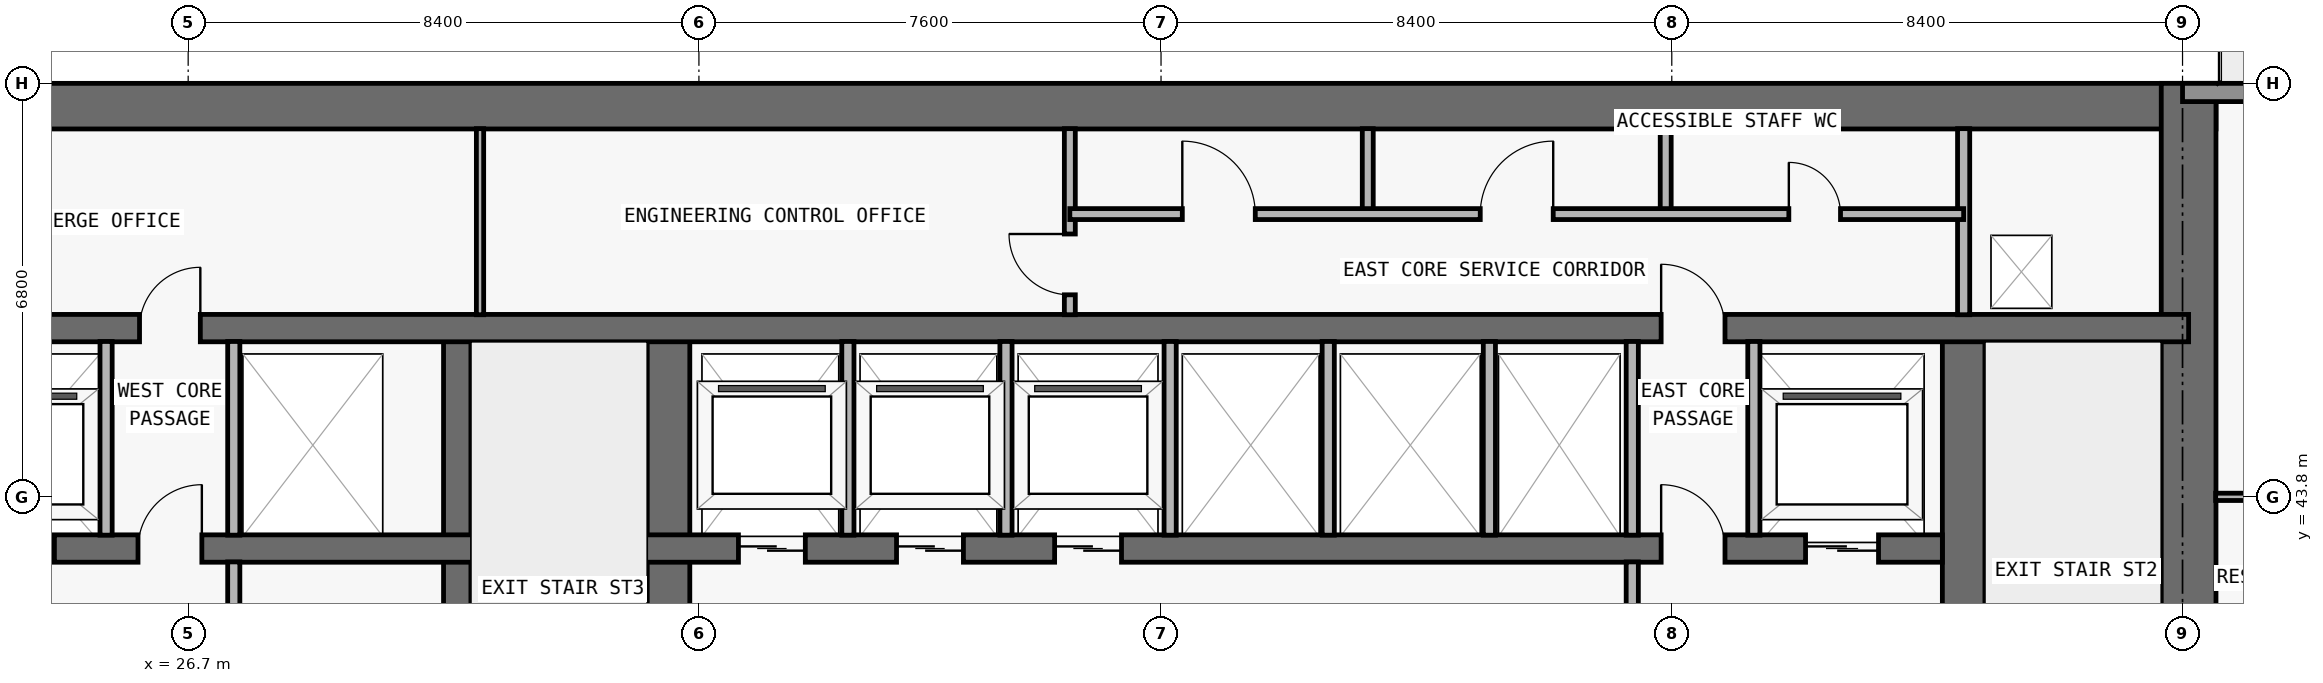
"""IFC4 building model, lengths in metres.
Left out: names, types, materials, properties, quantities, classifications, styles, units other than length and angle.
Written with IfcOpenShell. Run it as: python <this file> out.ifc"""

import sys

from ifc_helpers import new_model, si_unit, direction, frame, frame_2d, origin, place, context, subcontext, project, spatial, rectangle, extrude, element, fill, save


model = new_model("IFC4")
c1 = context("Model", 3, precision=1e-05, world=origin(), true_north=direction((0.0, 1.0)))
c2 = subcontext(c1, "Body", "Model", "MODEL_VIEW")
j1 = project(units=[si_unit("LENGTHUNIT", "METRE"), si_unit("PLANEANGLEUNIT", "RADIAN")], contexts=[c1])
p1 = place(None, origin())
s1 = spatial("IfcSite", under=j1, at=p1, CompositionType="ELEMENT")
p2 = place(p1, origin())
s2 = spatial("IfcBuilding", under=s1, at=p2, CompositionType="ELEMENT")
p3 = place(p2, frame((0.0, 0.0, 76.2)))
s3 = spatial("IfcBuildingStorey", under=s2, at=p3, CompositionType="ELEMENT", Elevation=76.2)
p4 = place(p3, frame((17.75, 50.225, 0.0), z_axis=(0.0, 0.0, 1.0), x_axis=(1.0, 0.0, 0.0)))
e1 = element("IfcWall", 1, at=p4, inside=s3, PredefinedType="SHEAR", context=c2, shape_type="SweptSolid", body=[
    extrude(rectangle(XDim=42.3, YDim=0.75, at=frame_2d((21.15, 0.0))), origin(), (0.0, 0.0, 1.0), 3.0),
])
p5 = place(p3, frame((59.6, 36.45, 0.0), z_axis=(0.0, 0.0, 1.0), x_axis=(0.0, 1.0, 0.0)))
e2 = element("IfcWall", 2, at=p5, inside=s3, PredefinedType="SHEAR", context=c2, shape_type="SweptSolid", body=[
    extrude(rectangle(XDim=14.15, YDim=0.9, at=frame_2d((7.075, 0.0))), origin(), (0.0, 0.0, 1.0), 3.0),
])
p6 = place(p3, frame((55.9, 36.9, 0.0), z_axis=(0.0, 0.0, 1.0), x_axis=(0.0, 1.0, 0.0)))
e3 = element("IfcWall", 3, at=p6, inside=s3, PredefinedType="SHEAR", context=c2, shape_type="SweptSolid", body=[
    extrude(rectangle(XDim=9.675, YDim=0.7, at=frame_2d((4.837, 0.0))), origin(), (0.0, 0.0, 1.0), 3.0),
])
p7 = place(p6, frame((0.65, 0.0, 0.0)))
e4 = element("IfcOpeningElement", 4, at=p7, cuts=e3, PredefinedType="OPENING", context=c2, shape_type="SweptSolid", body=[
    extrude(rectangle(XDim=1.1, YDim=2.15, at=frame_2d((0.55, 1.075))), frame((0.0, 0.36, 0.0), z_axis=(0.0, -1.0, 0.0), x_axis=(1.0, 0.0, 0.0)), (0.0, 0.0, 1.0), 0.72),
])
p8 = place(p3, frame((31.125, 36.9, 0.0), z_axis=(0.0, 0.0, 1.0), x_axis=(0.0, 1.0, 0.0)))
e5 = element("IfcWall", 5, at=p8, inside=s3, PredefinedType="SHEAR", context=c2, shape_type="SweptSolid", body=[
    extrude(rectangle(XDim=9.675, YDim=0.45, at=frame_2d((4.837, 0.0))), origin(), (0.0, 0.0, 1.0), 3.0),
])
p9 = place(p3, frame((34.6, 36.9, 0.0), z_axis=(0.0, 0.0, 1.0), x_axis=(0.0, 1.0, 0.0)))
e6 = element("IfcWall", 6, at=p9, inside=s3, PredefinedType="SHEAR", context=c2, shape_type="SweptSolid", body=[
    extrude(rectangle(XDim=9.675, YDim=0.7, at=frame_2d((4.837, 0.0))), origin(), (0.0, 0.0, 1.0), 3.0),
])
p10 = place(p3, frame((22.25, 42.95, 0.0), z_axis=(0.0, 0.0, 1.0), x_axis=(1.0, 0.0, 0.0)))
e7 = element("IfcWall", 7, at=p10, inside=s3, PredefinedType="SHEAR", context=c2, shape_type="SweptSolid", body=[
    extrude(rectangle(XDim=33.3, YDim=0.45, at=frame_2d((16.65, 0.0))), origin(), (0.0, 0.0, 1.0), 3.0),
])
p11 = place(p10, frame((1.05, 0.0, 0.0)))
e8 = element("IfcOpeningElement", 8, at=p11, cuts=e7, PredefinedType="OPENING", context=c2, shape_type="SweptSolid", body=[
    extrude(rectangle(XDim=1.2, YDim=2.2, at=frame_2d((0.6, 1.1))), frame((0.0, 0.235, 0.0), z_axis=(0.0, -1.0, 0.0), x_axis=(1.0, 0.0, 0.0)), (0.0, 0.0, 1.0), 0.47),
])
p12 = place(p10, frame((31.05, 0.0, 0.0)))
e9 = element("IfcOpeningElement", 9, at=p12, cuts=e7, PredefinedType="OPENING", context=c2, shape_type="SweptSolid", body=[
    extrude(rectangle(XDim=1.2, YDim=2.2, at=frame_2d((0.6, 1.1))), frame((0.0, 0.235, 0.0), z_axis=(0.0, -1.0, 0.0), x_axis=(1.0, 0.0, 0.0)), (0.0, 0.0, 1.0), 0.47),
])
p13 = place(p10, frame((13.5, 0.0, 0.0)))
e10 = element("IfcOpeningElement", 10, at=p13, cuts=e7, PredefinedType="OPENING", context=c2, shape_type="SweptSolid", body=[
    extrude(rectangle(XDim=1.1, YDim=2.2, at=frame_2d((0.55, 1.1))), frame((0.0, 0.235, 0.0), z_axis=(0.0, -1.0, 0.0), x_axis=(1.0, 0.0, 0.0)), (0.0, 0.0, 1.0), 0.47),
])
p14 = place(p10, frame((16.1, 0.0, 0.0)))
e11 = element("IfcOpeningElement", 11, at=p14, cuts=e7, PredefinedType="OPENING", context=c2, shape_type="SweptSolid", body=[
    extrude(rectangle(XDim=1.1, YDim=2.2, at=frame_2d((0.55, 1.1))), frame((0.0, 0.235, 0.0), z_axis=(0.0, -1.0, 0.0), x_axis=(1.0, 0.0, 0.0)), (0.0, 0.0, 1.0), 0.47),
])
p15 = place(p10, frame((18.7, 0.0, 0.0)))
e12 = element("IfcOpeningElement", 12, at=p15, cuts=e7, PredefinedType="OPENING", context=c2, shape_type="SweptSolid", body=[
    extrude(rectangle(XDim=1.1, YDim=2.2, at=frame_2d((0.55, 1.1))), frame((0.0, 0.235, 0.0), z_axis=(0.0, -1.0, 0.0), x_axis=(1.0, 0.0, 0.0)), (0.0, 0.0, 1.0), 0.47),
])
p16 = place(p10, frame((3.625, 0.0, 0.0)))
e13 = element("IfcOpeningElement", 13, at=p16, cuts=e7, PredefinedType="OPENING", context=c2, shape_type="SweptSolid", body=[
    extrude(rectangle(XDim=1.05, YDim=2.15, at=frame_2d((0.525, 1.075))), frame((0.0, 0.235, 0.0), z_axis=(0.0, -1.0, 0.0), x_axis=(1.0, 0.0, 0.0)), (0.0, 0.0, 1.0), 0.47),
])
p17 = place(p10, frame((28.675, 0.0, 0.0)))
e14 = element("IfcOpeningElement", 14, at=p17, cuts=e7, PredefinedType="OPENING", context=c2, shape_type="SweptSolid", body=[
    extrude(rectangle(XDim=1.05, YDim=2.15, at=frame_2d((0.525, 1.075))), frame((0.0, 0.235, 0.0), z_axis=(0.0, -1.0, 0.0), x_axis=(1.0, 0.0, 0.0)), (0.0, 0.0, 1.0), 0.47),
])
p18 = place(p3, frame((18.2, 46.575, 0.0), z_axis=(0.0, 0.0, 1.0), x_axis=(1.0, 0.0, 0.0)))
e15 = element("IfcWall", 15, at=p18, inside=s3, PredefinedType="SHEAR", context=c2, shape_type="SweptSolid", body=[
    extrude(rectangle(XDim=41.4, YDim=0.45, at=frame_2d((20.7, 0.0))), origin(), (0.0, 0.0, 1.0), 3.0),
])
p19 = place(p18, frame((7.7, 0.0, 0.0)))
e16 = element("IfcOpeningElement", 16, at=p19, cuts=e15, PredefinedType="OPENING", context=c2, shape_type="SweptSolid", body=[
    extrude(rectangle(XDim=1.0, YDim=2.2, at=frame_2d((0.5, 1.1))), frame((0.0, 0.235, 0.0), z_axis=(0.0, -1.0, 0.0), x_axis=(1.0, 0.0, 0.0)), (0.0, 0.0, 1.0), 0.47),
])
p20 = place(p18, frame((32.725, 0.0, 0.0)))
e17 = element("IfcOpeningElement", 17, at=p20, cuts=e15, PredefinedType="OPENING", context=c2, shape_type="SweptSolid", body=[
    extrude(rectangle(XDim=1.05, YDim=2.15, at=frame_2d((0.525, 1.075))), frame((0.0, 0.235, 0.0), z_axis=(0.0, -1.0, 0.0), x_axis=(1.0, 0.0, 0.0)), (0.0, 0.0, 1.0), 0.47),
])
p21 = place(p3, frame((59.5, 50.45, 0.0), z_axis=(0.0, 0.0, 1.0), x_axis=(1.0, 0.0, 0.0)))
e18 = element("IfcWall", 18, at=p21, inside=s3, PredefinedType="STANDARD", context=c2, shape_type="SweptSolid", body=[
    extrude(rectangle(XDim=13.2, YDim=0.3, at=frame_2d((6.6, 0.0))), origin(), (0.0, 0.0, 1.0), 3.0),
])
p22 = place(p21, frame((5.6, 0.0, 0.0)))
e19 = element("IfcOpeningElement", 19, at=p22, cuts=e18, PredefinedType="OPENING", context=c2, shape_type="SweptSolid", body=[
    extrude(rectangle(XDim=2.0, YDim=2.3, at=frame_2d((1.0, 1.15))), frame((0.0, 0.16, 0.0), z_axis=(0.0, -1.0, 0.0), x_axis=(1.0, 0.0, 0.0)), (0.0, 0.0, 1.0), 0.32),
])
p23 = place(p3, frame((25.35, 43.17, 0.0), z_axis=(0.0, 0.0, 1.0), x_axis=(0.0, 1.0, 0.0)))
e20 = element("IfcWall", 20, at=p23, inside=s3, PredefinedType="PARTITIONING", context=c2, shape_type="SweptSolid", body=[
    extrude(rectangle(XDim=3.185, YDim=0.2, at=frame_2d((1.593, 0.0))), origin(), (0.0, 0.0, 1.0), 3.0),
])
p24 = place(p3, frame((27.45, 37.345, 0.0), z_axis=(0.0, 0.0, 1.0), x_axis=(0.0, 1.0, 0.0)))
e21 = element("IfcWall", 21, at=p24, inside=s3, PredefinedType="PARTITIONING", context=c2, shape_type="SweptSolid", body=[
    extrude(rectangle(XDim=5.385, YDim=0.2, at=frame_2d((2.692, 0.0))), origin(), (0.0, 0.0, 1.0), 3.0),
])
p25 = place(p3, frame((27.45, 43.17, 0.0), z_axis=(0.0, 0.0, 1.0), x_axis=(0.0, 1.0, 0.0)))
e22 = element("IfcWall", 22, at=p25, inside=s3, PredefinedType="PARTITIONING", context=c2, shape_type="SweptSolid", body=[
    extrude(rectangle(XDim=3.185, YDim=0.2, at=frame_2d((1.593, 0.0))), origin(), (0.0, 0.0, 1.0), 3.0),
])
p26 = place(p3, frame((31.5, 46.795, 0.0), z_axis=(0.0, 0.0, 1.0), x_axis=(0.0, 1.0, 0.0)))
e23 = element("IfcWall", 23, at=p26, inside=s3, PredefinedType="PARTITIONING", context=c2, shape_type="SweptSolid", body=[
    extrude(rectangle(XDim=3.06, YDim=0.12, at=frame_2d((1.53, 0.0))), origin(), (0.0, 0.0, 1.0), 3.0),
])
for number, where, z_axis, x_axis in (
    (24, (37.55, 43.17, 0.0), (0.0, 0.0, 1.0), (0.0, 1.0, 0.0)),
    (25, (40.15, 43.17, 0.0), (0.0, 0.0, 1.0), (0.0, 1.0, 0.0)),
):
    element("IfcWall", number, at=place(p3, frame(where, z_axis=z_axis, x_axis=x_axis)), inside=s3, PredefinedType="PARTITIONING", context=c2, shape_type="SweptSolid", body=[
        extrude(rectangle(XDim=3.185, YDim=0.2, at=frame_2d((1.593, 0.0))), origin(), (0.0, 0.0, 1.0), 3.0),
    ])
p27 = place(p3, frame((41.2, 46.795, 0.0), z_axis=(0.0, 0.0, 1.0), x_axis=(0.0, 1.0, 0.0)))
e26 = element("IfcWall", 26, at=p27, inside=s3, PredefinedType="PARTITIONING", context=c2, shape_type="SweptSolid", body=[
    extrude(rectangle(XDim=3.06, YDim=0.18, at=frame_2d((1.53, 0.0))), origin(), (0.0, 0.0, 1.0), 3.0),
])
p28 = place(p27, frame((0.327, 0.0, 0.0)))
e27 = element("IfcOpeningElement", 27, at=p28, cuts=e26, PredefinedType="OPENING", context=c2, shape_type="SweptSolid", body=[
    extrude(rectangle(XDim=1.0, YDim=2.2, at=frame_2d((0.5, 1.1))), frame((0.0, 0.1, 0.0), z_axis=(0.0, -1.0, 0.0), x_axis=(1.0, 0.0, 0.0)), (0.0, 0.0, 1.0), 0.2),
])
for number, where, z_axis, x_axis in (
    (28, (42.85, 43.17, 0.0), (0.0, 0.0, 1.0), (0.0, 1.0, 0.0)),
    (29, (45.45, 43.17, 0.0), (0.0, 0.0, 1.0), (0.0, 1.0, 0.0)),
):
    element("IfcWall", number, at=place(p3, frame(where, z_axis=z_axis, x_axis=x_axis)), inside=s3, PredefinedType="PARTITIONING", context=c2, shape_type="SweptSolid", body=[
        extrude(rectangle(XDim=3.185, YDim=0.2, at=frame_2d((1.593, 0.0))), origin(), (0.0, 0.0, 1.0), 3.0),
    ])
p29 = place(p3, frame((46.1, 48.45, 0.0), z_axis=(0.0, 0.0, 1.0), x_axis=(0.0, 1.0, 0.0)))
e30 = element("IfcWall", 30, at=p29, inside=s3, PredefinedType="PARTITIONING", context=c2, shape_type="SweptSolid", body=[
    extrude(rectangle(XDim=1.405, YDim=0.18, at=frame_2d((0.703, 0.0))), origin(), (0.0, 0.0, 1.0), 3.0),
])
p30 = place(p3, frame((48.1, 43.17, 0.0), z_axis=(0.0, 0.0, 1.0), x_axis=(0.0, 1.0, 0.0)))
e31 = element("IfcWall", 31, at=p30, inside=s3, PredefinedType="PARTITIONING", context=c2, shape_type="SweptSolid", body=[
    extrude(rectangle(XDim=3.185, YDim=0.2, at=frame_2d((1.593, 0.0))), origin(), (0.0, 0.0, 1.0), 3.0),
])
p31 = place(p3, frame((50.45, 37.345, 0.0), z_axis=(0.0, 0.0, 1.0), x_axis=(0.0, 1.0, 0.0)))
e32 = element("IfcWall", 32, at=p31, inside=s3, PredefinedType="PARTITIONING", context=c2, shape_type="SweptSolid", body=[
    extrude(rectangle(XDim=5.385, YDim=0.2, at=frame_2d((2.692, 0.0))), origin(), (0.0, 0.0, 1.0), 3.0),
])
p32 = place(p3, frame((50.45, 43.17, 0.0), z_axis=(0.0, 0.0, 1.0), x_axis=(0.0, 1.0, 0.0)))
e33 = element("IfcWall", 33, at=p32, inside=s3, PredefinedType="PARTITIONING", context=c2, shape_type="SweptSolid", body=[
    extrude(rectangle(XDim=3.185, YDim=0.2, at=frame_2d((1.593, 0.0))), origin(), (0.0, 0.0, 1.0), 3.0),
])
p33 = place(p3, frame((51.0, 48.45, 0.0), z_axis=(0.0, 0.0, 1.0), x_axis=(0.0, 1.0, 0.0)))
e34 = element("IfcWall", 34, at=p33, inside=s3, PredefinedType="PARTITIONING", context=c2, shape_type="SweptSolid", body=[
    extrude(rectangle(XDim=1.405, YDim=0.18, at=frame_2d((0.703, 0.0))), origin(), (0.0, 0.0, 1.0), 3.0),
])
p34 = place(p3, frame((52.45, 43.17, 0.0), z_axis=(0.0, 0.0, 1.0), x_axis=(0.0, 1.0, 0.0)))
e35 = element("IfcWall", 35, at=p34, inside=s3, PredefinedType="PARTITIONING", context=c2, shape_type="SweptSolid", body=[
    extrude(rectangle(XDim=3.185, YDim=0.2, at=frame_2d((1.593, 0.0))), origin(), (0.0, 0.0, 1.0), 3.0),
])
p35 = place(p3, frame((55.9, 46.795, 0.0), z_axis=(0.0, 0.0, 1.0), x_axis=(0.0, 1.0, 0.0)))
e36 = element("IfcWall", 36, at=p35, inside=s3, PredefinedType="PARTITIONING", context=c2, shape_type="SweptSolid", body=[
    extrude(rectangle(XDim=3.06, YDim=0.2, at=frame_2d((1.53, 0.0))), origin(), (0.0, 0.0, 1.0), 3.0),
])
p36 = place(p3, frame((60.045, 43.8, 0.0), z_axis=(0.0, 0.0, 1.0), x_axis=(1.0, 0.0, 0.0)))
e37 = element("IfcWall", 37, at=p36, inside=s3, PredefinedType="PARTITIONING", context=c2, shape_type="SweptSolid", body=[
    extrude(rectangle(XDim=15.96, YDim=0.12, at=frame_2d((7.98, 0.0))), origin(), (0.0, 0.0, 1.0), 2.289),
])
p37 = place(p36, frame((9.805, 0.0, 0.0)))
e38 = element("IfcOpeningElement", 38, at=p37, cuts=e37, PredefinedType="OPENING", context=c2, shape_type="SweptSolid", body=[
    extrude(rectangle(XDim=0.9, YDim=2.15, at=frame_2d((0.45, 1.075))), frame((0.0, 0.07, 0.0), z_axis=(0.0, -1.0, 0.0), x_axis=(1.0, 0.0, 0.0)), (0.0, 0.0, 1.0), 0.14),
])
p38 = place(p36, frame((4.58, 0.0, 0.0)))
e39 = element("IfcOpeningElement", 39, at=p38, cuts=e37, PredefinedType="OPENING", context=c2, shape_type="SweptSolid", body=[
    extrude(rectangle(XDim=0.9, YDim=2.15, at=frame_2d((0.45, 1.075))), frame((0.0, 0.07, 0.0), z_axis=(0.0, -1.0, 0.0), x_axis=(1.0, 0.0, 0.0)), (0.0, 0.0, 1.0), 0.14),
])
p39 = place(p36, frame((0.677, 0.0, 0.0)))
e40 = element("IfcOpeningElement", 40, at=p39, cuts=e37, PredefinedType="OPENING", context=c2, shape_type="SweptSolid", body=[
    extrude(rectangle(XDim=0.85, YDim=2.1, at=frame_2d((0.425, 1.05))), frame((0.0, 0.07, 0.0), z_axis=(0.0, -1.0, 0.0), x_axis=(1.0, 0.0, 0.0)), (0.0, 0.0, 1.0), 0.14),
])
p40 = place(p3, frame((41.2, 48.45, 0.0), z_axis=(0.0, 0.0, 1.0), x_axis=(1.0, 0.0, 0.0)))
e41 = element("IfcWall", 41, at=p40, inside=s3, PredefinedType="PARTITIONING", context=c2, shape_type="SweptSolid", body=[
    extrude(rectangle(XDim=14.7, YDim=0.18, at=frame_2d((7.35, 0.0))), origin(), (0.0, 0.0, 1.0), 3.0),
])
p41 = place(p40, frame((1.85, 0.0, 0.0)))
e42 = element("IfcOpeningElement", 42, at=p41, cuts=e41, PredefinedType="OPENING", context=c2, shape_type="SweptSolid", body=[
    extrude(rectangle(XDim=1.2, YDim=2.2, at=frame_2d((0.6, 1.1))), frame((0.0, 0.1, 0.0), z_axis=(0.0, -1.0, 0.0), x_axis=(1.0, 0.0, 0.0)), (0.0, 0.0, 1.0), 0.2),
])
p42 = place(p40, frame((6.75, 0.0, 0.0)))
e43 = element("IfcOpeningElement", 43, at=p42, cuts=e41, PredefinedType="OPENING", context=c2, shape_type="SweptSolid", body=[
    extrude(rectangle(XDim=1.2, YDim=2.2, at=frame_2d((0.6, 1.1))), frame((0.0, 0.1, 0.0), z_axis=(0.0, -1.0, 0.0), x_axis=(1.0, 0.0, 0.0)), (0.0, 0.0, 1.0), 0.2),
])
p43 = place(p40, frame((11.825, 0.0, 0.0)))
e44 = element("IfcOpeningElement", 44, at=p43, cuts=e41, PredefinedType="OPENING", context=c2, shape_type="SweptSolid", body=[
    extrude(rectangle(XDim=0.85, YDim=2.1, at=frame_2d((0.425, 1.05))), frame((0.0, 0.1, 0.0), z_axis=(0.0, -1.0, 0.0), x_axis=(1.0, 0.0, 0.0)), (0.0, 0.0, 1.0), 0.2),
])
p44 = place(p11, origin())
e45 = element("IfcDoor", 45, at=p44, inside=s3, OperationType="DOUBLE_DOOR_SLIDING", PredefinedType="DOOR", context=c2, shape_type="SweptSolid", body=[
    extrude(rectangle(XDim=1.2, YDim=2.2, at=frame_2d((0.6, 1.1))), frame((0.0, 0.025, 0.0), z_axis=(0.0, -1.0, 0.0), x_axis=(1.0, 0.0, 0.0)), (0.0, 0.0, 1.0), 0.05),
])
fill(e8, e45)
p45 = place(p12, origin())
e46 = element("IfcDoor", 46, at=p45, inside=s3, OperationType="DOUBLE_DOOR_SLIDING", PredefinedType="DOOR", context=c2, shape_type="SweptSolid", body=[
    extrude(rectangle(XDim=1.2, YDim=2.2, at=frame_2d((0.6, 1.1))), frame((0.0, 0.025, 0.0), z_axis=(0.0, -1.0, 0.0), x_axis=(1.0, 0.0, 0.0)), (0.0, 0.0, 1.0), 0.05),
])
fill(e9, e46)
p46 = place(p13, origin())
e47 = element("IfcDoor", 47, at=p46, inside=s3, OperationType="DOUBLE_DOOR_SLIDING", PredefinedType="DOOR", context=c2, shape_type="SweptSolid", body=[
    extrude(rectangle(XDim=1.1, YDim=2.2, at=frame_2d((0.55, 1.1))), frame((0.0, 0.025, 0.0), z_axis=(0.0, -1.0, 0.0), x_axis=(1.0, 0.0, 0.0)), (0.0, 0.0, 1.0), 0.05),
])
fill(e10, e47)
p47 = place(p14, origin())
e48 = element("IfcDoor", 48, at=p47, inside=s3, OperationType="DOUBLE_DOOR_SLIDING", PredefinedType="DOOR", context=c2, shape_type="SweptSolid", body=[
    extrude(rectangle(XDim=1.1, YDim=2.2, at=frame_2d((0.55, 1.1))), frame((0.0, 0.025, 0.0), z_axis=(0.0, -1.0, 0.0), x_axis=(1.0, 0.0, 0.0)), (0.0, 0.0, 1.0), 0.05),
])
fill(e11, e48)
p48 = place(p15, origin())
e49 = element("IfcDoor", 49, at=p48, inside=s3, OperationType="DOUBLE_DOOR_SLIDING", PredefinedType="DOOR", context=c2, shape_type="SweptSolid", body=[
    extrude(rectangle(XDim=1.1, YDim=2.2, at=frame_2d((0.55, 1.1))), frame((0.0, 0.025, 0.0), z_axis=(0.0, -1.0, 0.0), x_axis=(1.0, 0.0, 0.0)), (0.0, 0.0, 1.0), 0.05),
])
fill(e12, e49)
p49 = place(p16, origin())
e50 = element("IfcDoor", 50, at=p49, inside=s3, OperationType="SINGLE_SWING_RIGHT", PredefinedType="DOOR", context=c2, shape_type="SweptSolid", body=[
    extrude(rectangle(XDim=1.05, YDim=2.15, at=frame_2d((0.525, 1.075))), frame((0.0, 0.025, 0.0), z_axis=(0.0, -1.0, 0.0), x_axis=(1.0, 0.0, 0.0)), (0.0, 0.0, 1.0), 0.05),
])
fill(e13, e50)
p50 = place(p17, origin())
e51 = element("IfcDoor", 51, at=p50, inside=s3, OperationType="SINGLE_SWING_LEFT", PredefinedType="DOOR", context=c2, shape_type="SweptSolid", body=[
    extrude(rectangle(XDim=1.05, YDim=2.15, at=frame_2d((0.525, 1.075))), frame((0.0, 0.025, 0.0), z_axis=(0.0, -1.0, 0.0), x_axis=(1.0, 0.0, 0.0)), (0.0, 0.0, 1.0), 0.05),
])
fill(e14, e51)
p51 = place(p19, origin())
e52 = element("IfcDoor", 52, at=p51, inside=s3, OperationType="SINGLE_SWING_RIGHT", PredefinedType="DOOR", context=c2, shape_type="SweptSolid", body=[
    extrude(rectangle(XDim=1.0, YDim=2.2, at=frame_2d((0.5, 1.1))), frame((0.0, 0.025, 0.0), z_axis=(0.0, -1.0, 0.0), x_axis=(1.0, 0.0, 0.0)), (0.0, 0.0, 1.0), 0.05),
])
fill(e16, e52)
p52 = place(p20, origin())
e53 = element("IfcDoor", 53, at=p52, inside=s3, OperationType="SINGLE_SWING_LEFT", PredefinedType="DOOR", context=c2, shape_type="SweptSolid", body=[
    extrude(rectangle(XDim=1.05, YDim=2.15, at=frame_2d((0.525, 1.075))), frame((0.0, 0.025, 0.0), z_axis=(0.0, -1.0, 0.0), x_axis=(1.0, 0.0, 0.0)), (0.0, 0.0, 1.0), 0.05),
])
fill(e17, e53)
p53 = place(p28, origin())
e54 = element("IfcDoor", 54, at=p53, inside=s3, OperationType="SINGLE_SWING_RIGHT", PredefinedType="DOOR", context=c2, shape_type="SweptSolid", body=[
    extrude(rectangle(XDim=1.0, YDim=2.2, at=frame_2d((0.5, 1.1))), frame((0.0, 0.025, 0.0), z_axis=(0.0, -1.0, 0.0), x_axis=(1.0, 0.0, 0.0)), (0.0, 0.0, 1.0), 0.05),
])
fill(e27, e54)
p54 = place(p41, origin())
e55 = element("IfcDoor", 55, at=p54, inside=s3, OperationType="SINGLE_SWING_LEFT", PredefinedType="DOOR", context=c2, shape_type="SweptSolid", body=[
    extrude(rectangle(XDim=1.2, YDim=2.2, at=frame_2d((0.6, 1.1))), frame((0.0, 0.025, 0.0), z_axis=(0.0, -1.0, 0.0), x_axis=(1.0, 0.0, 0.0)), (0.0, 0.0, 1.0), 0.05),
])
fill(e42, e55)
p55 = place(p42, origin())
e56 = element("IfcDoor", 56, at=p55, inside=s3, OperationType="SINGLE_SWING_RIGHT", PredefinedType="DOOR", context=c2, shape_type="SweptSolid", body=[
    extrude(rectangle(XDim=1.2, YDim=2.2, at=frame_2d((0.6, 1.1))), frame((0.0, 0.025, 0.0), z_axis=(0.0, -1.0, 0.0), x_axis=(1.0, 0.0, 0.0)), (0.0, 0.0, 1.0), 0.05),
])
fill(e43, e56)
p56 = place(p43, origin())
e57 = element("IfcDoor", 57, at=p56, inside=s3, OperationType="SINGLE_SWING_LEFT", PredefinedType="DOOR", context=c2, shape_type="SweptSolid", body=[
    extrude(rectangle(XDim=0.85, YDim=2.1, at=frame_2d((0.425, 1.05))), frame((0.0, 0.025, 0.0), z_axis=(0.0, -1.0, 0.0), x_axis=(1.0, 0.0, 0.0)), (0.0, 0.0, 1.0), 0.05),
])
fill(e44, e57)
save(model, sys.argv[1])
